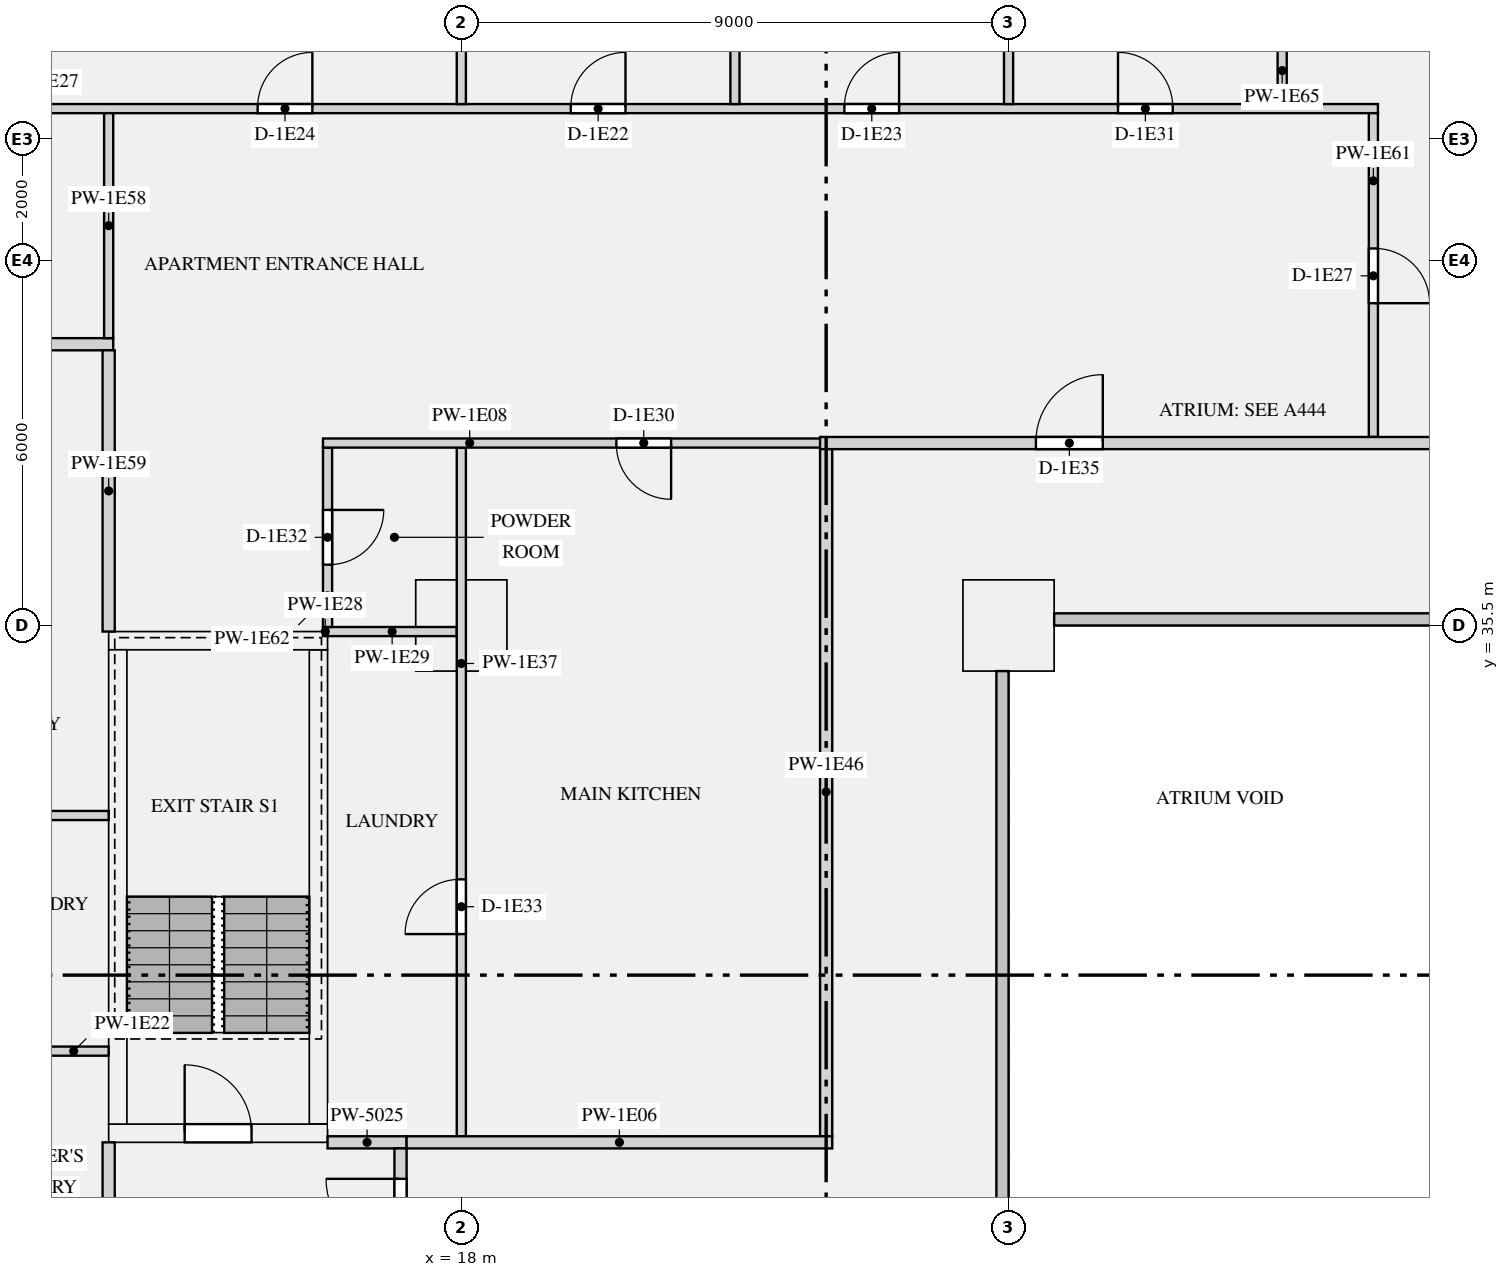
"""IFC4 building model, lengths in metres.
Left out: names, types, materials, properties, quantities, classifications, styles, units other than length and angle.
Written with IfcOpenShell. Run it as: python <this file> out.ifc"""

import sys

from ifc_helpers import new_model, si_unit, direction, frame, frame_2d, origin, origin_2d, place, context, subcontext, project, spatial, rectangle, extrude, element, fill, save


model = new_model("IFC4")
c1 = context("Model", 3, precision=1e-05, world=origin(), true_north=direction((0.0, 1.0)))
c2 = subcontext(c1, "Body", "Model", "MODEL_VIEW")
j1 = project(units=[si_unit("LENGTHUNIT", "METRE"), si_unit("PLANEANGLEUNIT", "RADIAN")], contexts=[c1])
p1 = place(None, origin())
s1 = spatial("IfcSite", under=j1, at=p1, CompositionType="ELEMENT")
p2 = place(p1, origin())
s2 = spatial("IfcBuilding", under=s1, at=p2, CompositionType="ELEMENT")
p3 = place(p2, frame((0.0, 0.0, 54.15)))
s3 = spatial("IfcBuildingStorey", under=s2, at=p3, CompositionType="ELEMENT", Elevation=54.15)
for number, where, z_axis, x_axis in (
    (1, (18.0, 35.5, 0.0), (0.0, 0.0, 1.0), (1.0, 0.0, 0.0)),
    (2, (27.0, 35.5, 0.0), (0.0, 0.0, 1.0), (1.0, 0.0, 0.0)),
):
    element("IfcColumn", number, at=place(p3, frame(where, z_axis=z_axis, x_axis=x_axis)), inside=s3, PredefinedType="COLUMN", context=c2, shape_type="SweptSolid", body=[
        extrude(rectangle(XDim=1.5, YDim=1.5, at=origin_2d()), origin(), (0.0, 0.0, 1.0), 3.15),
    ])
p4 = place(p3, frame((12.2, 27.15, 0.0), z_axis=(0.0, 0.0, 1.0), x_axis=(1.0, 0.0, 0.0)))
e3 = element("IfcWall", 3, at=p4, inside=s3, PredefinedType="SHEAR", context=c2, shape_type="SweptSolid", body=[
    extrude(rectangle(XDim=3.6, YDim=0.3, at=frame_2d((1.8, 0.0))), origin(), (0.0, 0.0, 1.0), 3.15),
])
p5 = place(p4, frame((1.25, 0.0, 0.0)))
e4 = element("IfcOpeningElement", 4, at=p5, cuts=e3, PredefinedType="OPENING", context=c2, shape_type="SweptSolid", body=[
    extrude(rectangle(XDim=1.1, YDim=2.1, at=frame_2d((0.55, 1.05))), frame((0.0, 0.16, 0.0), z_axis=(0.0, -1.0, 0.0), x_axis=(1.0, 0.0, 0.0)), (0.0, 0.0, 1.0), 0.32),
])
p6 = place(p3, frame((12.2, 35.25, 0.0), z_axis=(0.0, 0.0, 1.0), x_axis=(1.0, 0.0, 0.0)))
e5 = element("IfcWall", 5, at=p6, inside=s3, PredefinedType="SHEAR", context=c2, shape_type="SweptSolid", body=[
    extrude(rectangle(XDim=3.6, YDim=0.3, at=frame_2d((1.8, 0.0))), origin(), (0.0, 0.0, 1.0), 3.15),
])
for number, where, z_axis, x_axis in (
    (6, (12.35, 27.3, 0.0), (0.0, 0.0, 1.0), (0.0, 1.0, 0.0)),
    (7, (15.65, 27.3, 0.0), (0.0, 0.0, 1.0), (0.0, 1.0, 0.0)),
):
    element("IfcWall", number, at=place(p3, frame(where, z_axis=z_axis, x_axis=x_axis)), inside=s3, PredefinedType="SHEAR", context=c2, shape_type="SweptSolid", body=[
        extrude(rectangle(XDim=7.8, YDim=0.3, at=frame_2d((3.9, 0.0))), origin(), (0.0, 0.0, 1.0), 3.15),
    ])
p7 = place(p3, frame((15.8, 27.0, 0.0), z_axis=(0.0, 0.0, 1.0), x_axis=(1.0, 0.0, 0.0)))
e8 = element("IfcWall", 8, at=p7, inside=s3, PredefinedType="PARTITIONING", context=c2, shape_type="SweptSolid", body=[
    extrude(rectangle(XDim=1.3, YDim=0.2, at=frame_2d((0.65, 0.0))), origin(), (0.0, 0.0, 1.0), 2.83),
])
p8 = place(p3, frame((12.2, 23.1, 0.0), z_axis=(0.0, 0.0, 1.0), x_axis=(0.0, 1.0, 0.0)))
e9 = element("IfcWall", 9, at=p8, inside=s3, PredefinedType="PARTITIONING", context=c2, shape_type="SweptSolid", body=[
    extrude(rectangle(XDim=3.9, YDim=0.2, at=frame_2d((1.95, 0.0))), origin(), (0.0, 0.0, 1.0), 2.83),
])
p9 = place(p3, frame((17.0, 23.1, 0.0), z_axis=(0.0, 0.0, 1.0), x_axis=(0.0, 1.0, 0.0)))
e10 = element("IfcWall", 10, at=p9, inside=s3, PredefinedType="PARTITIONING", context=c2, shape_type="SweptSolid", body=[
    extrude(rectangle(XDim=3.8, YDim=0.2, at=frame_2d((1.9, 0.0))), origin(), (0.0, 0.0, 1.0), 2.83),
])
p10 = place(p9, frame((2.1, 0.0, 0.0)))
e11 = element("IfcOpeningElement", 11, at=p10, cuts=e10, PredefinedType="OPENING", context=c2, shape_type="SweptSolid", body=[
    extrude(rectangle(XDim=1.2, YDim=2.1, at=frame_2d((0.6, 1.05))), frame((0.0, 0.11, 0.0), z_axis=(0.0, -1.0, 0.0), x_axis=(1.0, 0.0, 0.0)), (0.0, 0.0, 1.0), 0.22),
])
p11 = place(p3, frame((17.1, 27.0, 0.0), z_axis=(0.0, 0.0, 1.0), x_axis=(1.0, 0.0, 0.0)))
e12 = element("IfcWall", 12, at=p11, inside=s3, PredefinedType="PARTITIONING", context=c2, shape_type="SweptSolid", body=[
    extrude(rectangle(XDim=7.0, YDim=0.2, at=frame_2d((3.5, 0.0))), origin(), (0.0, 0.0, 1.0), 2.83),
])
p12 = place(p3, frame((15.725, 38.5, 0.0), z_axis=(0.0, 0.0, 1.0), x_axis=(1.0, 0.0, 0.0)))
e13 = element("IfcWall", 13, at=p12, inside=s3, PredefinedType="PARTITIONING", context=c2, shape_type="SweptSolid", body=[
    extrude(rectangle(XDim=8.375, YDim=0.15, at=frame_2d((4.188, 0.0))), origin(), (0.0, 0.0, 1.0), 2.83),
])
p13 = place(p12, frame((4.825, 0.0, 0.0)))
e14 = element("IfcOpeningElement", 14, at=p13, cuts=e13, PredefinedType="OPENING", context=c2, shape_type="SweptSolid", body=[
    extrude(rectangle(XDim=0.9, YDim=2.1, at=frame_2d((0.45, 1.05))), frame((0.0, 0.085, 0.0), z_axis=(0.0, -1.0, 0.0), x_axis=(1.0, 0.0, 0.0)), (0.0, 0.0, 1.0), 0.17),
])
p14 = place(p3, frame((23.9, 38.5, 0.0), z_axis=(0.0, 0.0, 1.0), x_axis=(1.0, 0.0, 0.0)))
e15 = element("IfcWall", 15, at=p14, inside=s3, PredefinedType="PARTITIONING", context=c2, shape_type="SweptSolid", body=[
    extrude(rectangle(XDim=24.2, YDim=0.2, at=frame_2d((12.1, 0.0))), origin(), (0.0, 0.0, 1.0), 2.83),
])
p15 = place(p14, frame((3.55, 0.0, 0.0)))
e16 = element("IfcOpeningElement", 16, at=p15, cuts=e15, PredefinedType="OPENING", context=c2, shape_type="SweptSolid", body=[
    extrude(rectangle(XDim=1.1, YDim=2.1, at=frame_2d((0.55, 1.05))), frame((0.0, 0.11, 0.0), z_axis=(0.0, -1.0, 0.0), x_axis=(1.0, 0.0, 0.0)), (0.0, 0.0, 1.0), 0.22),
])
p16 = place(p3, frame((0.8, 32.375, 0.0), z_axis=(0.0, 0.0, 1.0), x_axis=(1.0, 0.0, 0.0)))
e17 = element("IfcWall", 17, at=p16, inside=s3, PredefinedType="PARTITIONING", context=c2, shape_type="SweptSolid", body=[
    extrude(rectangle(XDim=11.4, YDim=0.15, at=frame_2d((5.7, 0.0))), origin(), (0.0, 0.0, 1.0), 2.83),
])
p17 = place(p16, frame((3.275, 0.0, 0.0)))
e18 = element("IfcOpeningElement", 18, at=p17, cuts=e17, PredefinedType="OPENING", context=c2, shape_type="SweptSolid", body=[
    extrude(rectangle(XDim=1.5, YDim=2.1, at=frame_2d((0.75, 1.05))), frame((0.0, 0.085, 0.0), z_axis=(0.0, -1.0, 0.0), x_axis=(1.0, 0.0, 0.0)), (0.0, 0.0, 1.0), 0.17),
])
p18 = place(p16, frame((9.35, 0.0, 0.0)))
e19 = element("IfcOpeningElement", 19, at=p18, cuts=e17, PredefinedType="OPENING", context=c2, shape_type="SweptSolid", body=[
    extrude(rectangle(XDim=0.9, YDim=2.1, at=frame_2d((0.45, 1.05))), frame((0.0, 0.085, 0.0), z_axis=(0.0, -1.0, 0.0), x_axis=(1.0, 0.0, 0.0)), (0.0, 0.0, 1.0), 0.17),
])
p19 = place(p3, frame((9.075, 28.5, 0.0), z_axis=(0.0, 0.0, 1.0), x_axis=(1.0, 0.0, 0.0)))
e20 = element("IfcWall", 20, at=p19, inside=s3, PredefinedType="PARTITIONING", context=c2, shape_type="SweptSolid", body=[
    extrude(rectangle(XDim=3.125, YDim=0.15, at=frame_2d((1.562, 0.0))), origin(), (0.0, 0.0, 1.0), 2.83),
])
p20 = place(p19, frame((1.075, 0.0, 0.0)))
e21 = element("IfcOpeningElement", 21, at=p20, cuts=e20, PredefinedType="OPENING", context=c2, shape_type="SweptSolid", body=[
    extrude(rectangle(XDim=0.9, YDim=2.1, at=frame_2d((0.45, 1.05))), frame((0.0, 0.085, 0.0), z_axis=(0.0, -1.0, 0.0), x_axis=(1.0, 0.0, 0.0)), (0.0, 0.0, 1.0), 0.17),
])
p21 = place(p3, frame((0.8, 40.125, 0.0), z_axis=(0.0, 0.0, 1.0), x_axis=(1.0, 0.0, 0.0)))
e22 = element("IfcWall", 22, at=p21, inside=s3, PredefinedType="PARTITIONING", context=c2, shape_type="SweptSolid", body=[
    extrude(rectangle(XDim=11.475, YDim=0.2, at=frame_2d((5.737, 0.0))), origin(), (0.0, 0.0, 1.0), 2.83),
])
p22 = place(p3, frame((5.3, 44.0, 0.0), z_axis=(0.0, 0.0, 1.0), x_axis=(1.0, 0.0, 0.0)))
e23 = element("IfcWall", 23, at=p22, inside=s3, PredefinedType="PARTITIONING", context=c2, shape_type="SweptSolid", body=[
    extrude(rectangle(XDim=27.775, YDim=0.15, at=frame_2d((13.887, 0.0))), origin(), (0.0, 0.0, 1.0), 2.83),
])
p23 = place(p22, frame((14.5, 0.0, 0.0)))
e24 = element("IfcOpeningElement", 24, at=p23, cuts=e23, PredefinedType="OPENING", context=c2, shape_type="SweptSolid", body=[
    extrude(rectangle(XDim=0.9, YDim=2.1, at=frame_2d((0.45, 1.05))), frame((0.0, 0.085, 0.0), z_axis=(0.0, -1.0, 0.0), x_axis=(1.0, 0.0, 0.0)), (0.0, 0.0, 1.0), 0.17),
])
p24 = place(p22, frame((19.0, 0.0, 0.0)))
e25 = element("IfcOpeningElement", 25, at=p24, cuts=e23, PredefinedType="OPENING", context=c2, shape_type="SweptSolid", body=[
    extrude(rectangle(XDim=0.9, YDim=2.1, at=frame_2d((0.45, 1.05))), frame((0.0, 0.085, 0.0), z_axis=(0.0, -1.0, 0.0), x_axis=(1.0, 0.0, 0.0)), (0.0, 0.0, 1.0), 0.17),
])
p25 = place(p22, frame((9.35, 0.0, 0.0)))
e26 = element("IfcOpeningElement", 26, at=p25, cuts=e23, PredefinedType="OPENING", context=c2, shape_type="SweptSolid", body=[
    extrude(rectangle(XDim=0.9, YDim=2.1, at=frame_2d((0.45, 1.05))), frame((0.0, 0.085, 0.0), z_axis=(0.0, -1.0, 0.0), x_axis=(1.0, 0.0, 0.0)), (0.0, 0.0, 1.0), 0.17),
])
p26 = place(p22, frame((23.5, 0.0, 0.0)))
e27 = element("IfcOpeningElement", 27, at=p26, cuts=e23, PredefinedType="OPENING", context=c2, shape_type="SweptSolid", body=[
    extrude(rectangle(XDim=0.9, YDim=2.1, at=frame_2d((0.45, 1.05))), frame((0.0, 0.085, 0.0), z_axis=(0.0, -1.0, 0.0), x_axis=(1.0, 0.0, 0.0)), (0.0, 0.0, 1.0), 0.17),
])
p27 = place(p22, frame((1.325, 0.0, 0.0)))
e28 = element("IfcOpeningElement", 28, at=p27, cuts=e23, PredefinedType="OPENING", context=c2, shape_type="SweptSolid", body=[
    extrude(rectangle(XDim=0.9, YDim=2.1, at=frame_2d((0.45, 1.05))), frame((0.0, 0.085, 0.0), z_axis=(0.0, -1.0, 0.0), x_axis=(1.0, 0.0, 0.0)), (0.0, 0.0, 1.0), 0.17),
])
p28 = place(p3, frame((15.725, 35.4, 0.0), z_axis=(0.0, 0.0, 1.0), x_axis=(1.0, 0.0, 0.0)))
e29 = element("IfcWall", 29, at=p28, inside=s3, PredefinedType="PARTITIONING", context=c2, shape_type="SweptSolid", body=[
    extrude(rectangle(XDim=0.075, YDim=0.15, at=frame_2d((0.038, 0.0))), origin(), (0.0, 0.0, 1.0), 2.83),
])
p29 = place(p3, frame((15.8, 35.4, 0.0), z_axis=(0.0, 0.0, 1.0), x_axis=(1.0, 0.0, 0.0)))
e30 = element("IfcWall", 30, at=p29, inside=s3, PredefinedType="PARTITIONING", context=c2, shape_type="SweptSolid", body=[
    extrude(rectangle(XDim=2.125, YDim=0.15, at=frame_2d((1.062, 0.0))), origin(), (0.0, 0.0, 1.0), 2.83),
])
p30 = place(p3, frame((18.0, 27.1, 0.0), z_axis=(0.0, 0.0, 1.0), x_axis=(0.0, 1.0, 0.0)))
e31 = element("IfcWall", 31, at=p30, inside=s3, PredefinedType="PARTITIONING", context=c2, shape_type="SweptSolid", body=[
    extrude(rectangle(XDim=11.325, YDim=0.15, at=frame_2d((5.663, 0.0))), origin(), (0.0, 0.0, 1.0), 2.83),
])
p31 = place(p30, frame((3.325, 0.0, 0.0)))
e32 = element("IfcOpeningElement", 32, at=p31, cuts=e31, PredefinedType="OPENING", context=c2, shape_type="SweptSolid", body=[
    extrude(rectangle(XDim=0.9, YDim=2.1, at=frame_2d((0.45, 1.05))), frame((0.0, 0.085, 0.0), z_axis=(0.0, -1.0, 0.0), x_axis=(1.0, 0.0, 0.0)), (0.0, 0.0, 1.0), 0.17),
])
p32 = place(p3, frame((18.0, 44.075, 0.0), z_axis=(0.0, 0.0, 1.0), x_axis=(0.0, 1.0, 0.0)))
e33 = element("IfcWall", 33, at=p32, inside=s3, PredefinedType="PARTITIONING", context=c2, shape_type="SweptSolid", body=[
    extrude(rectangle(XDim=3.625, YDim=0.15, at=frame_2d((1.812, 0.0))), origin(), (0.0, 0.0, 1.0), 2.83),
])
p33 = place(p3, frame((24.0, 27.1, 0.0), z_axis=(0.0, 0.0, 1.0), x_axis=(0.0, 1.0, 0.0)))
e34 = element("IfcWall", 34, at=p33, inside=s3, PredefinedType="PARTITIONING", context=c2, shape_type="SweptSolid", body=[
    extrude(rectangle(XDim=11.325, YDim=0.2, at=frame_2d((5.663, 0.0))), origin(), (0.0, 0.0, 1.0), 2.83),
])
p34 = place(p3, frame((12.2, 40.225, 0.0), z_axis=(0.0, 0.0, 1.0), x_axis=(0.0, 1.0, 0.0)))
e35 = element("IfcWall", 35, at=p34, inside=s3, PredefinedType="PARTITIONING", context=c2, shape_type="SweptSolid", body=[
    extrude(rectangle(XDim=3.7, YDim=0.15, at=frame_2d((1.85, 0.0))), origin(), (0.0, 0.0, 1.0), 2.83),
])
p35 = place(p3, frame((12.2, 35.4, 0.0), z_axis=(0.0, 0.0, 1.0), x_axis=(0.0, 1.0, 0.0)))
e36 = element("IfcWall", 36, at=p35, inside=s3, PredefinedType="PARTITIONING", context=c2, shape_type="SweptSolid", body=[
    extrude(rectangle(XDim=4.625, YDim=0.2, at=frame_2d((2.312, 0.0))), origin(), (0.0, 0.0, 1.0), 2.83),
])
p36 = place(p3, frame((33.0, 38.6, 0.0), z_axis=(0.0, 0.0, 1.0), x_axis=(0.0, 1.0, 0.0)))
e37 = element("IfcWall", 37, at=p36, inside=s3, PredefinedType="PARTITIONING", context=c2, shape_type="SweptSolid", body=[
    extrude(rectangle(XDim=5.325, YDim=0.15, at=frame_2d((2.663, 0.0))), origin(), (0.0, 0.0, 1.0), 2.83),
])
p37 = place(p36, frame((2.2, 0.0, 0.0)))
e38 = element("IfcOpeningElement", 38, at=p37, cuts=e37, PredefinedType="OPENING", context=c2, shape_type="SweptSolid", body=[
    extrude(rectangle(XDim=0.9, YDim=2.1, at=frame_2d((0.45, 1.05))), frame((0.0, 0.085, 0.0), z_axis=(0.0, -1.0, 0.0), x_axis=(1.0, 0.0, 0.0)), (0.0, 0.0, 1.0), 0.17),
])
p38 = place(p3, frame((15.8, 35.475, 0.0), z_axis=(0.0, 0.0, 1.0), x_axis=(0.0, 1.0, 0.0)))
e39 = element("IfcWall", 39, at=p38, inside=s3, PredefinedType="PARTITIONING", context=c2, shape_type="SweptSolid", body=[
    extrude(rectangle(XDim=2.95, YDim=0.15, at=frame_2d((1.475, 0.0))), origin(), (0.0, 0.0, 1.0), 2.83),
])
p39 = place(p38, frame((1.025, 0.0, 0.0)))
e40 = element("IfcOpeningElement", 40, at=p39, cuts=e39, PredefinedType="OPENING", context=c2, shape_type="SweptSolid", body=[
    extrude(rectangle(XDim=0.9, YDim=2.1, at=frame_2d((0.45, 1.05))), frame((0.0, 0.085, 0.0), z_axis=(0.0, -1.0, 0.0), x_axis=(1.0, 0.0, 0.0)), (0.0, 0.0, 1.0), 0.17),
])
for number, where, z_axis, x_axis in (
    (41, (22.5, 44.075, 0.0), (0.0, 0.0, 1.0), (0.0, 1.0, 0.0)),
    (42, (27.0, 44.075, 0.0), (0.0, 0.0, 1.0), (0.0, 1.0, 0.0)),
):
    element("IfcWall", number, at=place(p3, frame(where, z_axis=z_axis, x_axis=x_axis)), inside=s3, PredefinedType="PARTITIONING", context=c2, shape_type="SweptSolid", body=[
        extrude(rectangle(XDim=3.625, YDim=0.15, at=frame_2d((1.812, 0.0))), origin(), (0.0, 0.0, 1.0), 2.83),
    ])
p40 = place(p3, frame((31.5, 44.075, 0.0), z_axis=(0.0, 0.0, 1.0), x_axis=(0.0, 1.0, 0.0)))
e43 = element("IfcWall", 43, at=p40, inside=s3, PredefinedType="PARTITIONING", context=c2, shape_type="SweptSolid", body=[
    extrude(rectangle(XDim=3.625, YDim=0.15, at=frame_2d((1.812, 0.0))), origin(), (0.0, 0.0, 1.0), 2.83),
])
p41 = place(p40, frame((1.1, 0.0, 0.0)))
e44 = element("IfcOpeningElement", 44, at=p41, cuts=e43, PredefinedType="OPENING", context=c2, shape_type="SweptSolid", body=[
    extrude(rectangle(XDim=1.5, YDim=2.1, at=frame_2d((0.75, 1.05))), frame((0.0, 0.085, 0.0), z_axis=(0.0, -1.0, 0.0), x_axis=(1.0, 0.0, 0.0)), (0.0, 0.0, 1.0), 0.17),
])
p42 = place(p5, origin())
e45 = element("IfcDoor", 45, at=p42, inside=s3, OperationType="SINGLE_SWING_LEFT", PredefinedType="DOOR", context=c2, shape_type="SweptSolid", body=[
    extrude(rectangle(XDim=1.1, YDim=2.1, at=frame_2d((0.55, 1.05))), frame((0.0, 0.025, 0.0), z_axis=(0.0, -1.0, 0.0), x_axis=(1.0, 0.0, 0.0)), (0.0, 0.0, 1.0), 0.05),
])
fill(e4, e45)
p43 = place(p10, origin())
e46 = element("IfcDoor", 46, at=p43, inside=s3, OperationType="SINGLE_SWING_RIGHT", PredefinedType="DOOR", context=c2, shape_type="SweptSolid", body=[
    extrude(rectangle(XDim=1.2, YDim=2.1, at=frame_2d((0.6, 1.05))), frame((0.0, 0.025, 0.0), z_axis=(0.0, -1.0, 0.0), x_axis=(1.0, 0.0, 0.0)), (0.0, 0.0, 1.0), 0.05),
])
fill(e11, e46)
p44 = place(p23, origin())
e47 = element("IfcDoor", 47, at=p44, inside=s3, OperationType="SINGLE_SWING_RIGHT", PredefinedType="DOOR", context=c2, shape_type="SweptSolid", body=[
    extrude(rectangle(XDim=0.9, YDim=2.1, at=frame_2d((0.45, 1.05))), frame((0.0, 0.025, 0.0), z_axis=(0.0, -1.0, 0.0), x_axis=(1.0, 0.0, 0.0)), (0.0, 0.0, 1.0), 0.05),
])
fill(e24, e47)
p45 = place(p24, origin())
e48 = element("IfcDoor", 48, at=p45, inside=s3, OperationType="SINGLE_SWING_RIGHT", PredefinedType="DOOR", context=c2, shape_type="SweptSolid", body=[
    extrude(rectangle(XDim=0.9, YDim=2.1, at=frame_2d((0.45, 1.05))), frame((0.0, 0.025, 0.0), z_axis=(0.0, -1.0, 0.0), x_axis=(1.0, 0.0, 0.0)), (0.0, 0.0, 1.0), 0.05),
])
fill(e25, e48)
p46 = place(p25, origin())
e49 = element("IfcDoor", 49, at=p46, inside=s3, OperationType="SINGLE_SWING_RIGHT", PredefinedType="DOOR", context=c2, shape_type="SweptSolid", body=[
    extrude(rectangle(XDim=0.9, YDim=2.1, at=frame_2d((0.45, 1.05))), frame((0.0, 0.025, 0.0), z_axis=(0.0, -1.0, 0.0), x_axis=(1.0, 0.0, 0.0)), (0.0, 0.0, 1.0), 0.05),
])
fill(e26, e49)
p47 = place(p37, frame((0.9, 0.0, 0.0), z_axis=(0.0, 0.0, 1.0), x_axis=(-1.0, 0.0, 0.0)))
e50 = element("IfcDoor", 50, at=p47, inside=s3, OperationType="SINGLE_SWING_RIGHT", PredefinedType="DOOR", context=c2, shape_type="SweptSolid", body=[
    extrude(rectangle(XDim=0.9, YDim=2.1, at=frame_2d((0.45, 1.05))), frame((0.0, 0.025, 0.0), z_axis=(0.0, -1.0, 0.0), x_axis=(1.0, 0.0, 0.0)), (0.0, 0.0, 1.0), 0.05),
])
fill(e38, e50)
p48 = place(p13, frame((0.9, 0.0, 0.0), z_axis=(0.0, 0.0, 1.0), x_axis=(-1.0, 0.0, 0.0)))
e51 = element("IfcDoor", 51, at=p48, inside=s3, OperationType="SINGLE_SWING_LEFT", PredefinedType="DOOR", context=c2, shape_type="SweptSolid", body=[
    extrude(rectangle(XDim=0.9, YDim=2.1, at=frame_2d((0.45, 1.05))), frame((0.0, 0.025, 0.0), z_axis=(0.0, -1.0, 0.0), x_axis=(1.0, 0.0, 0.0)), (0.0, 0.0, 1.0), 0.05),
])
fill(e14, e51)
p49 = place(p26, origin())
e52 = element("IfcDoor", 52, at=p49, inside=s3, OperationType="SINGLE_SWING_LEFT", PredefinedType="DOOR", context=c2, shape_type="SweptSolid", body=[
    extrude(rectangle(XDim=0.9, YDim=2.1, at=frame_2d((0.45, 1.05))), frame((0.0, 0.025, 0.0), z_axis=(0.0, -1.0, 0.0), x_axis=(1.0, 0.0, 0.0)), (0.0, 0.0, 1.0), 0.05),
])
fill(e27, e52)
p50 = place(p39, frame((0.9, 0.0, 0.0), z_axis=(0.0, 0.0, 1.0), x_axis=(-1.0, 0.0, 0.0)))
e53 = element("IfcDoor", 53, at=p50, inside=s3, OperationType="SINGLE_SWING_LEFT", PredefinedType="DOOR", context=c2, shape_type="SweptSolid", body=[
    extrude(rectangle(XDim=0.9, YDim=2.1, at=frame_2d((0.45, 1.05))), frame((0.0, 0.025, 0.0), z_axis=(0.0, -1.0, 0.0), x_axis=(1.0, 0.0, 0.0)), (0.0, 0.0, 1.0), 0.05),
])
fill(e40, e53)
p51 = place(p31, origin())
e54 = element("IfcDoor", 54, at=p51, inside=s3, OperationType="SINGLE_SWING_LEFT", PredefinedType="DOOR", context=c2, shape_type="SweptSolid", body=[
    extrude(rectangle(XDim=0.9, YDim=2.1, at=frame_2d((0.45, 1.05))), frame((0.0, 0.025, 0.0), z_axis=(0.0, -1.0, 0.0), x_axis=(1.0, 0.0, 0.0)), (0.0, 0.0, 1.0), 0.05),
])
fill(e32, e54)
p52 = place(p15, origin())
e55 = element("IfcDoor", 55, at=p52, inside=s3, OperationType="SINGLE_SWING_RIGHT", PredefinedType="DOOR", context=c2, shape_type="SweptSolid", body=[
    extrude(rectangle(XDim=1.1, YDim=2.1, at=frame_2d((0.55, 1.05))), frame((0.0, 0.025, 0.0), z_axis=(0.0, -1.0, 0.0), x_axis=(1.0, 0.0, 0.0)), (0.0, 0.0, 1.0), 0.05),
])
fill(e16, e55)
save(model, sys.argv[1])
